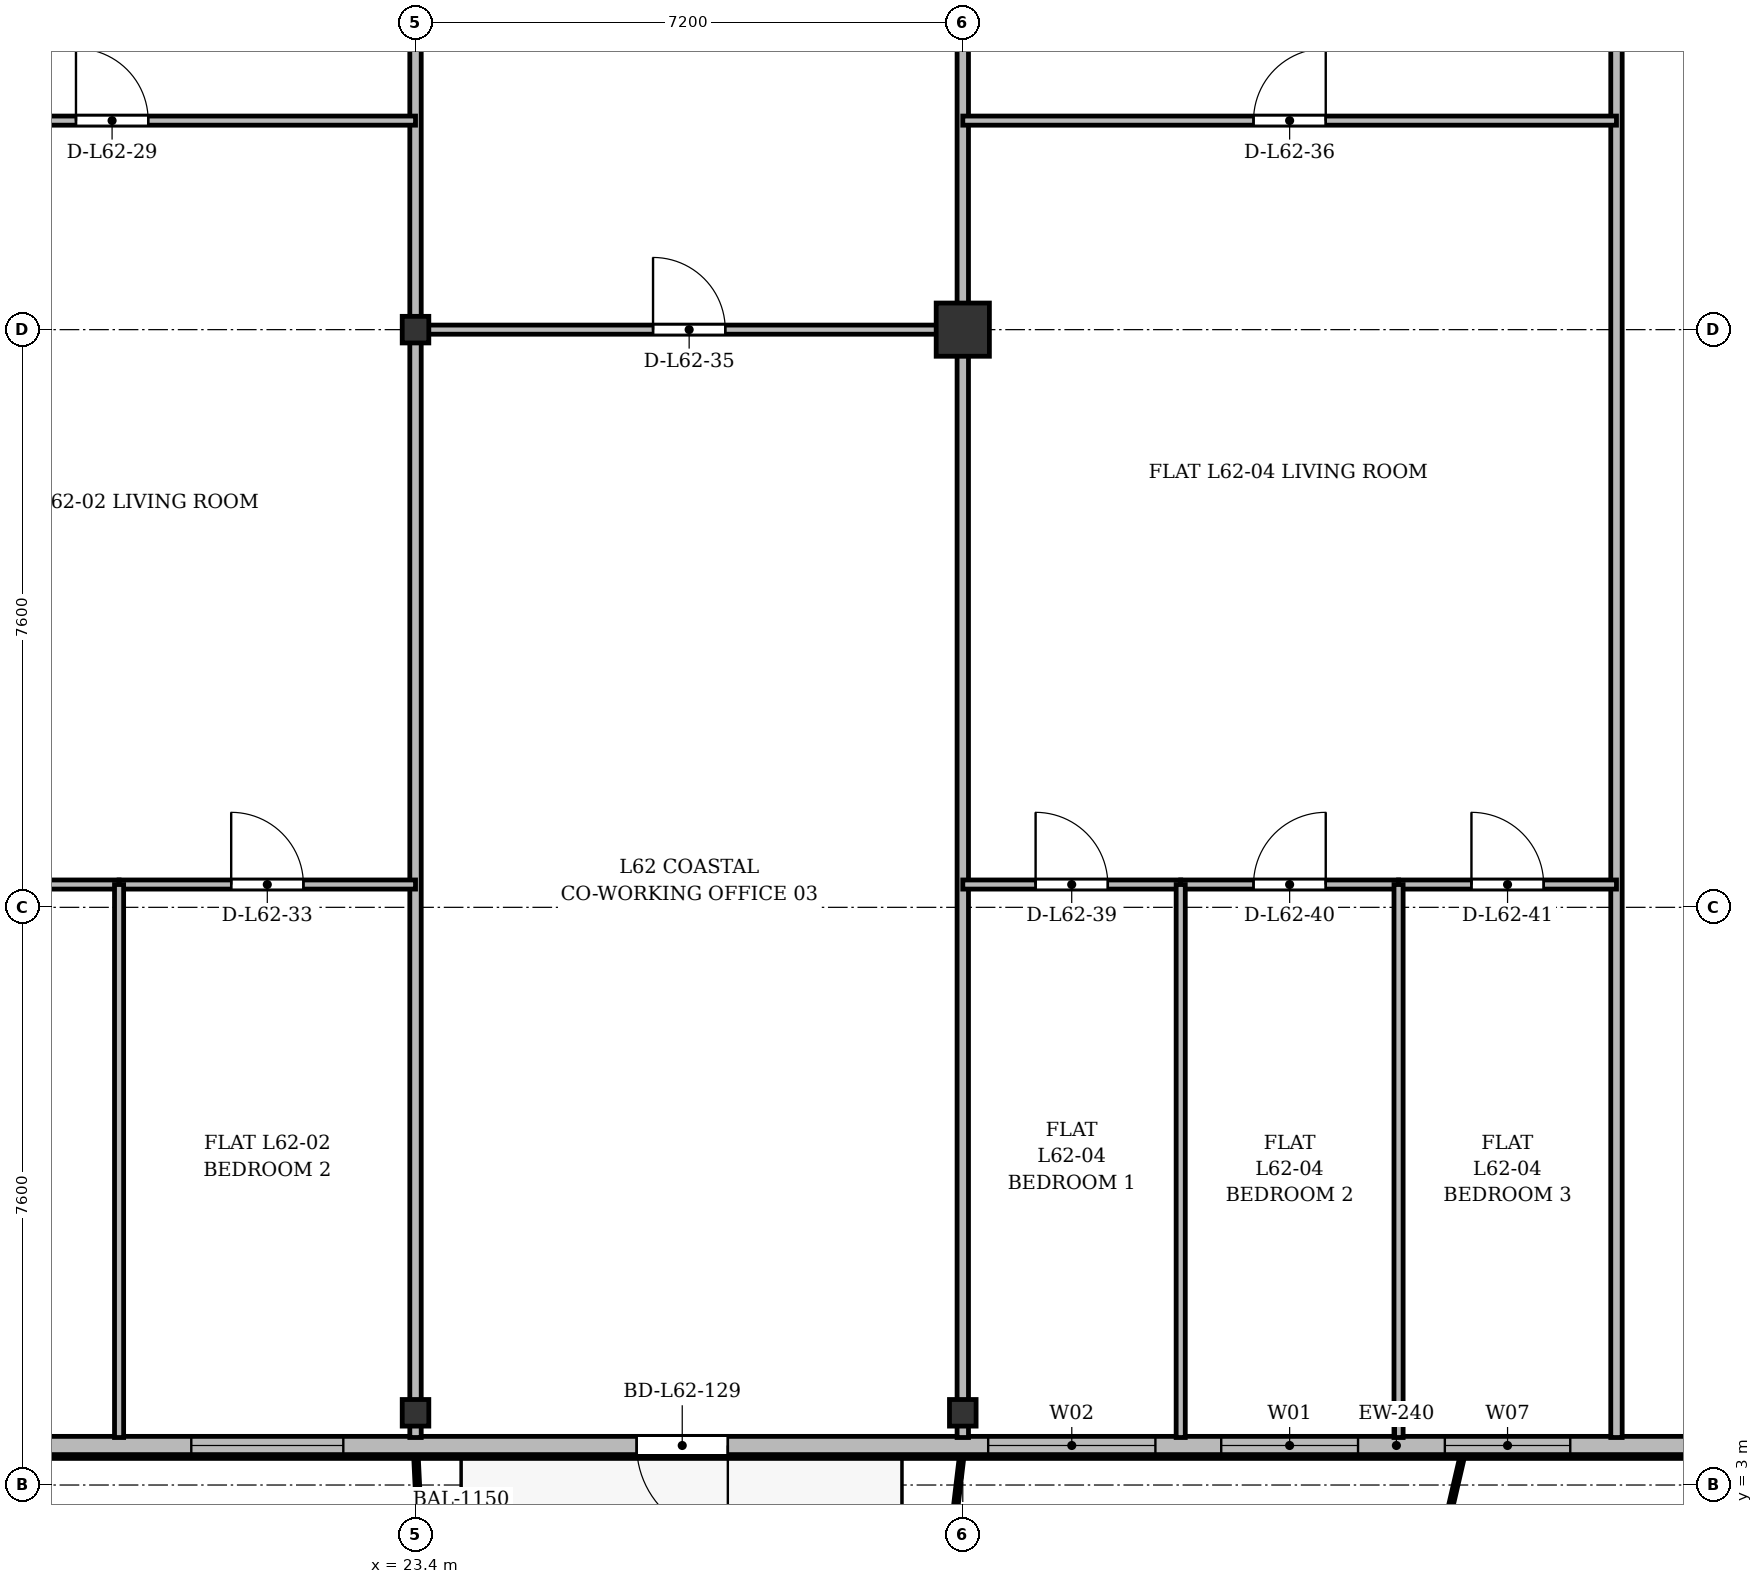
"""IFC4 building model, lengths in metres.
Left out: names, types, materials, properties, quantities, classifications, styles, units other than length and angle.
Written with IfcOpenShell. Run it as: python <this file> out.ifc"""

import sys

from ifc_helpers import new_model, si_unit, direction, frame, frame_2d, origin, origin_2d, place, context, subcontext, project, spatial, rectangle, i_section, extrude, source, transform, mapped, element, fill, save


model = new_model("IFC4")
c1 = context("Model", 3, precision=1e-05, world=origin(), true_north=direction((0.0, 1.0)))
c2 = subcontext(c1, "Body", "Model", "MODEL_VIEW")
j1 = project(units=[si_unit("LENGTHUNIT", "METRE"), si_unit("PLANEANGLEUNIT", "RADIAN")], contexts=[c1])
p1 = place(None, origin())
s1 = spatial("IfcSite", under=j1, at=p1, CompositionType="ELEMENT")
p2 = place(p1, origin())
s2 = spatial("IfcBuilding", under=s1, at=p2, CompositionType="ELEMENT")
p3 = place(p2, frame((0.0, 0.0, 237.3)))
s3 = spatial("IfcBuildingStorey", under=s2, at=p3, CompositionType="ELEMENT", Elevation=237.3)
m1 = source(origin(), c2, "Body", "SweptSolid", [
    extrude(i_section(OverallWidth=0.35, OverallDepth=0.35, WebThickness=0.018, FlangeThickness=0.028, at=origin_2d()), origin(), (0.0, 0.0, 1.0), 3.6),
])
for number, where, z_axis, x_axis in (
    (1, (23.4, 3.95, 0.0), (0.0, 0.0, 1.0), (1.0, 0.0, 0.0)),
    (2, (23.4, 18.2, 0.0), (0.0, 0.0, 1.0), (1.0, 0.0, 0.0)),
    (3, (30.6, 3.95, 0.0), (0.0, 0.0, 1.0), (1.0, 0.0, 0.0)),
):
    element("IfcColumn", number, at=place(p3, frame(where, z_axis=z_axis, x_axis=x_axis)), inside=s3, PredefinedType="COLUMN", context=c2, shape_type="MappedRepresentation", body=[
        mapped(m1, transform((0.0, 0.0, 0.0), x_axis=(1.0, 0.0, 0.0), y_axis=(0.0, 1.0, 0.0), z_axis=(0.0, 0.0, 1.0), scale=1.0)),
    ])
m2 = source(origin(), c2, "Body", "SweptSolid", [
    extrude(rectangle(XDim=0.7, YDim=0.7, at=origin_2d()), origin(), (0.0, 0.0, 1.0), 3.6),
])
p4 = place(p3, frame((30.6, 18.2, 0.0), z_axis=(0.0, 0.0, 1.0), x_axis=(1.0, 0.0, 0.0)))
e4 = element("IfcColumn", 4, at=p4, inside=s3, PredefinedType="COLUMN", context=c2, shape_type="MappedRepresentation", body=[
    mapped(m2, transform((0.0, 0.0, 0.0), x_axis=(1.0, 0.0, 0.0), y_axis=(0.0, 1.0, 0.0), z_axis=(0.0, 0.0, 1.0), scale=1.0)),
])
p5 = place(p3, frame((44.8, 3.52, 0.0), z_axis=(0.0, 0.0, 1.0), x_axis=(-1.0, 0.0, 0.0)))
e5 = element("IfcWall", 5, at=p5, inside=s3, PredefinedType="SOLIDWALL", context=c2, shape_type="SweptSolid", body=[
    extrude(rectangle(XDim=33.8, YDim=0.24, at=frame_2d((16.9, 0.0))), origin(), (0.0, 0.0, 1.0), 3.22),
])
p6 = place(p5, frame((2.3, 0.0, 0.9)))
e6 = element("IfcOpeningElement", 6, at=p6, cuts=e5, PredefinedType="OPENING", context=c2, shape_type="SweptSolid", body=[
    extrude(rectangle(XDim=2.0, YDim=1.95, at=frame_2d((1.0, 0.975))), frame((0.0, 0.13, 0.0), z_axis=(0.0, -1.0, 0.0), x_axis=(1.0, 0.0, 0.0)), (0.0, 0.0, 1.0), 0.26),
])
p7 = place(p5, frame((6.208, 0.0, 0.9)))
e7 = element("IfcOpeningElement", 7, at=p7, cuts=e5, PredefinedType="OPENING", context=c2, shape_type="SweptSolid", body=[
    extrude(rectangle(XDim=1.65, YDim=1.85, at=frame_2d((0.825, 0.925))), frame((0.0, 0.13, 0.0), z_axis=(0.0, -1.0, 0.0), x_axis=(1.0, 0.0, 0.0)), (0.0, 0.0, 1.0), 0.26),
])
p8 = place(p5, frame((9.0, 0.0, 0.9)))
e8 = element("IfcOpeningElement", 8, at=p8, cuts=e5, PredefinedType="OPENING", context=c2, shape_type="SweptSolid", body=[
    extrude(rectangle(XDim=1.8, YDim=1.8, at=frame_2d((0.9, 0.9))), frame((0.0, 0.13, 0.0), z_axis=(0.0, -1.0, 0.0), x_axis=(1.0, 0.0, 0.0)), (0.0, 0.0, 1.0), 0.26),
])
p9 = place(p5, frame((11.666, 0.0, 0.9)))
e9 = element("IfcOpeningElement", 9, at=p9, cuts=e5, PredefinedType="OPENING", context=c2, shape_type="SweptSolid", body=[
    extrude(rectangle(XDim=2.2, YDim=1.8, at=frame_2d((1.1, 0.9))), frame((0.0, 0.13, 0.0), z_axis=(0.0, -1.0, 0.0), x_axis=(1.0, 0.0, 0.0)), (0.0, 0.0, 1.0), 0.26),
])
p10 = place(p5, frame((17.291, 0.0, 0.0)))
e10 = element("IfcOpeningElement", 10, at=p10, cuts=e5, PredefinedType="OPENING", context=c2, shape_type="SweptSolid", body=[
    extrude(rectangle(XDim=1.2, YDim=2.2, at=frame_2d((0.6, 1.1))), frame((0.0, 0.13, 0.0), z_axis=(0.0, -1.0, 0.0), x_axis=(1.0, 0.0, 0.0)), (0.0, 0.0, 1.0), 0.26),
])
p11 = place(p5, frame((22.35, 0.0, 0.9)))
e11 = element("IfcOpeningElement", 11, at=p11, cuts=e5, PredefinedType="OPENING", context=c2, shape_type="SweptSolid", body=[
    extrude(rectangle(XDim=2.0, YDim=1.95, at=frame_2d((1.0, 0.975))), frame((0.0, 0.13, 0.0), z_axis=(0.0, -1.0, 0.0), x_axis=(1.0, 0.0, 0.0)), (0.0, 0.0, 1.0), 0.26),
])
p12 = place(p5, frame((26.425, 0.0, 0.9)))
e12 = element("IfcOpeningElement", 12, at=p12, cuts=e5, PredefinedType="OPENING", context=c2, shape_type="SweptSolid", body=[
    extrude(rectangle(XDim=1.65, YDim=1.85, at=frame_2d((0.825, 0.925))), frame((0.0, 0.13, 0.0), z_axis=(0.0, -1.0, 0.0), x_axis=(1.0, 0.0, 0.0)), (0.0, 0.0, 1.0), 0.26),
])
p13 = place(p5, frame((30.555, 0.0, 0.9)))
e13 = element("IfcOpeningElement", 13, at=p13, cuts=e5, PredefinedType="OPENING", context=c2, shape_type="SweptSolid", body=[
    extrude(rectangle(XDim=1.8, YDim=1.8, at=frame_2d((0.9, 0.9))), frame((0.0, 0.13, 0.0), z_axis=(0.0, -1.0, 0.0), x_axis=(1.0, 0.0, 0.0)), (0.0, 0.0, 1.0), 0.26),
])
for number, where, z_axis, x_axis in (
    (14, (23.4, 3.625, 0.0), (0.0, 0.0, 1.0), (0.0, 1.0, 0.0)),
    (15, (30.6, 3.625, 0.0), (0.0, 0.0, 1.0), (0.0, 1.0, 0.0)),
):
    element("IfcWall", number, at=place(p3, frame(where, z_axis=z_axis, x_axis=x_axis)), inside=s3, PredefinedType="PARTITIONING", context=c2, shape_type="SweptSolid", body=[
        extrude(rectangle(XDim=27.375, YDim=0.15, at=frame_2d((13.688, 0.0))), origin(), (0.0, 0.0, 1.0), 2.72),
    ])
p14 = place(p3, frame((39.2, 3.625, 0.0), z_axis=(0.0, 0.0, 1.0), x_axis=(0.0, 1.0, 0.0)))
e16 = element("IfcWall", 16, at=p14, inside=s3, PredefinedType="PARTITIONING", context=c2, shape_type="SweptSolid", body=[
    extrude(rectangle(XDim=27.375, YDim=0.15, at=frame_2d((13.688, 0.0))), origin(), (0.0, 0.0, 1.0), 2.77),
])
p15 = place(p3, frame((15.6, 20.95, 0.0), z_axis=(0.0, 0.0, 1.0), x_axis=(1.0, 0.0, 0.0)))
e17 = element("IfcWall", 17, at=p15, inside=s3, PredefinedType="PARTITIONING", context=c2, shape_type="SweptSolid", body=[
    extrude(rectangle(XDim=7.8, YDim=0.12, at=frame_2d((3.9, 0.0))), origin(), (0.0, 0.0, 1.0), 2.72),
])
p16 = place(p15, frame((3.333, 0.0, 0.0)))
e18 = element("IfcOpeningElement", 18, at=p16, cuts=e17, PredefinedType="OPENING", context=c2, shape_type="SweptSolid", body=[
    extrude(rectangle(XDim=0.95, YDim=2.15, at=frame_2d((0.475, 1.075))), frame((0.0, 0.07, 0.0), z_axis=(0.0, -1.0, 0.0), x_axis=(1.0, 0.0, 0.0)), (0.0, 0.0, 1.0), 0.14),
])
p17 = place(p3, frame((15.6, 10.9, 0.0), z_axis=(0.0, 0.0, 1.0), x_axis=(1.0, 0.0, 0.0)))
e19 = element("IfcWall", 19, at=p17, inside=s3, PredefinedType="PARTITIONING", context=c2, shape_type="SweptSolid", body=[
    extrude(rectangle(XDim=3.9, YDim=0.12, at=frame_2d((1.95, 0.0))), origin(), (0.0, 0.0, 1.0), 2.72),
])
p18 = place(p17, frame((1.475, 0.0, 0.0)))
e20 = element("IfcOpeningElement", 20, at=p18, cuts=e19, PredefinedType="OPENING", context=c2, shape_type="SweptSolid", body=[
    extrude(rectangle(XDim=0.95, YDim=2.15, at=frame_2d((0.475, 1.075))), frame((0.0, 0.07, 0.0), z_axis=(0.0, -1.0, 0.0), x_axis=(1.0, 0.0, 0.0)), (0.0, 0.0, 1.0), 0.14),
])
p19 = place(p3, frame((19.5, 10.9, 0.0), z_axis=(0.0, 0.0, 1.0), x_axis=(1.0, 0.0, 0.0)))
e21 = element("IfcWall", 21, at=p19, inside=s3, PredefinedType="PARTITIONING", context=c2, shape_type="SweptSolid", body=[
    extrude(rectangle(XDim=3.9, YDim=0.12, at=frame_2d((1.95, 0.0))), origin(), (0.0, 0.0, 1.0), 2.72),
])
p20 = place(p19, frame((1.475, 0.0, 0.0)))
e22 = element("IfcOpeningElement", 22, at=p20, cuts=e21, PredefinedType="OPENING", context=c2, shape_type="SweptSolid", body=[
    extrude(rectangle(XDim=0.95, YDim=2.15, at=frame_2d((0.475, 1.075))), frame((0.0, 0.07, 0.0), z_axis=(0.0, -1.0, 0.0), x_axis=(1.0, 0.0, 0.0)), (0.0, 0.0, 1.0), 0.14),
])
p21 = place(p3, frame((19.5, 3.625, 0.0), z_axis=(0.0, 0.0, 1.0), x_axis=(0.0, 1.0, 0.0)))
e23 = element("IfcWall", 23, at=p21, inside=s3, PredefinedType="PARTITIONING", context=c2, shape_type="SweptSolid", body=[
    extrude(rectangle(XDim=7.275, YDim=0.12, at=frame_2d((3.637, 0.0))), origin(), (0.0, 0.0, 1.0), 2.77),
])
p22 = place(p3, frame((23.4, 18.2, 0.0), z_axis=(0.0, 0.0, 1.0), x_axis=(1.0, 0.0, 0.0)))
e24 = element("IfcWall", 24, at=p22, inside=s3, PredefinedType="PARTITIONING", context=c2, shape_type="SweptSolid", body=[
    extrude(rectangle(XDim=7.2, YDim=0.12, at=frame_2d((3.6, 0.0))), origin(), (0.0, 0.0, 1.0), 2.77),
])
p23 = place(p22, frame((3.125, 0.0, 0.0)))
e25 = element("IfcOpeningElement", 25, at=p23, cuts=e24, PredefinedType="OPENING", context=c2, shape_type="SweptSolid", body=[
    extrude(rectangle(XDim=0.95, YDim=2.15, at=frame_2d((0.475, 1.075))), frame((0.0, 0.07, 0.0), z_axis=(0.0, -1.0, 0.0), x_axis=(1.0, 0.0, 0.0)), (0.0, 0.0, 1.0), 0.14),
])
p24 = place(p3, frame((30.6, 20.95, 0.0), z_axis=(0.0, 0.0, 1.0), x_axis=(1.0, 0.0, 0.0)))
e26 = element("IfcWall", 26, at=p24, inside=s3, PredefinedType="PARTITIONING", context=c2, shape_type="SweptSolid", body=[
    extrude(rectangle(XDim=8.6, YDim=0.12, at=frame_2d((4.3, 0.0))), origin(), (0.0, 0.0, 1.0), 2.72),
])
p25 = place(p24, frame((3.825, 0.0, 0.0)))
e27 = element("IfcOpeningElement", 27, at=p25, cuts=e26, PredefinedType="OPENING", context=c2, shape_type="SweptSolid", body=[
    extrude(rectangle(XDim=0.95, YDim=2.15, at=frame_2d((0.475, 1.075))), frame((0.0, 0.07, 0.0), z_axis=(0.0, -1.0, 0.0), x_axis=(1.0, 0.0, 0.0)), (0.0, 0.0, 1.0), 0.14),
])
p26 = place(p3, frame((30.6, 10.9, 0.0), z_axis=(0.0, 0.0, 1.0), x_axis=(1.0, 0.0, 0.0)))
e28 = element("IfcWall", 28, at=p26, inside=s3, PredefinedType="PARTITIONING", context=c2, shape_type="SweptSolid", body=[
    extrude(rectangle(XDim=2.867, YDim=0.12, at=frame_2d((1.434, 0.0))), origin(), (0.0, 0.0, 1.0), 2.72),
])
p27 = place(p26, frame((0.958, 0.0, 0.0)))
e29 = element("IfcOpeningElement", 29, at=p27, cuts=e28, PredefinedType="OPENING", context=c2, shape_type="SweptSolid", body=[
    extrude(rectangle(XDim=0.95, YDim=2.15, at=frame_2d((0.475, 1.075))), frame((0.0, 0.07, 0.0), z_axis=(0.0, -1.0, 0.0), x_axis=(1.0, 0.0, 0.0)), (0.0, 0.0, 1.0), 0.14),
])
p28 = place(p3, frame((33.467, 10.9, 0.0), z_axis=(0.0, 0.0, 1.0), x_axis=(1.0, 0.0, 0.0)))
e30 = element("IfcWall", 30, at=p28, inside=s3, PredefinedType="PARTITIONING", context=c2, shape_type="SweptSolid", body=[
    extrude(rectangle(XDim=2.866, YDim=0.12, at=frame_2d((1.433, 0.0))), origin(), (0.0, 0.0, 1.0), 3.22),
])
p29 = place(p28, frame((0.958, 0.0, 0.0)))
e31 = element("IfcOpeningElement", 31, at=p29, cuts=e30, PredefinedType="OPENING", context=c2, shape_type="SweptSolid", body=[
    extrude(rectangle(XDim=0.95, YDim=2.15, at=frame_2d((0.475, 1.075))), frame((0.0, 0.07, 0.0), z_axis=(0.0, -1.0, 0.0), x_axis=(1.0, 0.0, 0.0)), (0.0, 0.0, 1.0), 0.14),
])
p30 = place(p3, frame((33.467, 3.625, 0.0), z_axis=(0.0, 0.0, 1.0), x_axis=(0.0, 1.0, 0.0)))
e32 = element("IfcWall", 32, at=p30, inside=s3, PredefinedType="PARTITIONING", context=c2, shape_type="SweptSolid", body=[
    extrude(rectangle(XDim=7.275, YDim=0.12, at=frame_2d((3.637, 0.0))), origin(), (0.0, 0.0, 1.0), 2.77),
])
p31 = place(p3, frame((36.333, 10.9, 0.0), z_axis=(0.0, 0.0, 1.0), x_axis=(1.0, 0.0, 0.0)))
e33 = element("IfcWall", 33, at=p31, inside=s3, PredefinedType="PARTITIONING", context=c2, shape_type="SweptSolid", body=[
    extrude(rectangle(XDim=2.867, YDim=0.12, at=frame_2d((1.434, 0.0))), origin(), (0.0, 0.0, 1.0), 3.22),
])
p32 = place(p31, frame((0.959, 0.0, 0.0)))
e34 = element("IfcOpeningElement", 34, at=p32, cuts=e33, PredefinedType="OPENING", context=c2, shape_type="SweptSolid", body=[
    extrude(rectangle(XDim=0.95, YDim=2.15, at=frame_2d((0.475, 1.075))), frame((0.0, 0.07, 0.0), z_axis=(0.0, -1.0, 0.0), x_axis=(1.0, 0.0, 0.0)), (0.0, 0.0, 1.0), 0.14),
])
p33 = place(p3, frame((36.333, 3.625, 0.0), z_axis=(0.0, 0.0, 1.0), x_axis=(0.0, 1.0, 0.0)))
e35 = element("IfcWall", 35, at=p33, inside=s3, PredefinedType="PARTITIONING", context=c2, shape_type="SweptSolid", body=[
    extrude(rectangle(XDim=7.275, YDim=0.12, at=frame_2d((3.637, 0.0))), origin(), (0.0, 0.0, 1.0), 2.77),
])
m3 = source(origin(), c2, "Body", "SweptSolid", [
    extrude(rectangle(XDim=1.65, YDim=1.85, at=frame_2d((0.825, 0.925))), frame((0.0, 0.03, 0.0), z_axis=(0.0, -1.0, 0.0), x_axis=(1.0, 0.0, 0.0)), (0.0, 0.0, 1.0), 0.06),
])
p34 = place(p7, origin())
e36 = element("IfcWindow", 36, at=p34, inside=s3, PartitioningType="SINGLE_PANEL", PredefinedType="WINDOW", context=c2, shape_type="MappedRepresentation", body=[
    mapped(m3, transform((0.0, 0.0, 0.0), x_axis=(1.0, 0.0, 0.0), y_axis=(0.0, 1.0, 0.0), z_axis=(0.0, 0.0, 1.0), scale=1.0)),
])
fill(e7, e36)
m4 = source(origin(), c2, "Body", "SweptSolid", [
    extrude(rectangle(XDim=1.8, YDim=1.8, at=frame_2d((0.9, 0.9))), frame((0.0, 0.03, 0.0), z_axis=(0.0, -1.0, 0.0), x_axis=(1.0, 0.0, 0.0)), (0.0, 0.0, 1.0), 0.06),
])
p35 = place(p8, origin())
e37 = element("IfcWindow", 37, at=p35, inside=s3, PartitioningType="SINGLE_PANEL", PredefinedType="WINDOW", context=c2, shape_type="MappedRepresentation", body=[
    mapped(m4, transform((0.0, 0.0, 0.0), x_axis=(1.0, 0.0, 0.0), y_axis=(0.0, 1.0, 0.0), z_axis=(0.0, 0.0, 1.0), scale=1.0)),
])
fill(e8, e37)
m5 = source(origin(), c2, "Body", "SweptSolid", [
    extrude(rectangle(XDim=2.2, YDim=1.8, at=frame_2d((1.1, 0.9))), frame((0.0, 0.03, 0.0), z_axis=(0.0, -1.0, 0.0), x_axis=(1.0, 0.0, 0.0)), (0.0, 0.0, 1.0), 0.06),
])
p36 = place(p9, origin())
e38 = element("IfcWindow", 38, at=p36, inside=s3, PartitioningType="SINGLE_PANEL", PredefinedType="WINDOW", context=c2, shape_type="MappedRepresentation", body=[
    mapped(m5, transform((0.0, 0.0, 0.0), x_axis=(1.0, 0.0, 0.0), y_axis=(0.0, 1.0, 0.0), z_axis=(0.0, 0.0, 1.0), scale=1.0)),
])
fill(e9, e38)
m6 = source(origin(), c2, "Body", "SweptSolid", [
    extrude(rectangle(XDim=1.2, YDim=2.2, at=frame_2d((0.6, 1.1))), frame((0.0, 0.025, 0.0), z_axis=(0.0, -1.0, 0.0), x_axis=(1.0, 0.0, 0.0)), (0.0, 0.0, 1.0), 0.05),
])
p37 = place(p10, origin())
e39 = element("IfcDoor", 39, at=p37, inside=s3, OperationType="SINGLE_SWING_LEFT", PredefinedType="DOOR", context=c2, shape_type="MappedRepresentation", body=[
    mapped(m6, transform((0.0, 0.0, 0.0), x_axis=(1.0, 0.0, 0.0), y_axis=(0.0, 1.0, 0.0), z_axis=(0.0, 0.0, 1.0), scale=1.0)),
])
fill(e10, e39)
m7 = source(origin(), c2, "Body", "SweptSolid", [
    extrude(rectangle(XDim=2.0, YDim=1.95, at=frame_2d((1.0, 0.975))), frame((0.0, 0.03, 0.0), z_axis=(0.0, -1.0, 0.0), x_axis=(1.0, 0.0, 0.0)), (0.0, 0.0, 1.0), 0.06),
])
p38 = place(p11, origin())
e40 = element("IfcWindow", 40, at=p38, inside=s3, PartitioningType="SINGLE_PANEL", PredefinedType="WINDOW", context=c2, shape_type="MappedRepresentation", body=[
    mapped(m7, transform((0.0, 0.0, 0.0), x_axis=(1.0, 0.0, 0.0), y_axis=(0.0, 1.0, 0.0), z_axis=(0.0, 0.0, 1.0), scale=1.0)),
])
fill(e11, e40)
m8 = source(origin(), c2, "Body", "SweptSolid", [
    extrude(rectangle(XDim=0.95, YDim=2.15, at=frame_2d((0.475, 1.075))), frame((0.0, 0.025, 0.0), z_axis=(0.0, -1.0, 0.0), x_axis=(1.0, 0.0, 0.0)), (0.0, 0.0, 1.0), 0.05),
])
p39 = place(p16, origin())
e41 = element("IfcDoor", 41, at=p39, inside=s3, OperationType="SINGLE_SWING_LEFT", PredefinedType="DOOR", context=c2, shape_type="MappedRepresentation", body=[
    mapped(m8, transform((0.0, 0.0, 0.0), x_axis=(1.0, 0.0, 0.0), y_axis=(0.0, 1.0, 0.0), z_axis=(0.0, 0.0, 1.0), scale=1.0)),
])
fill(e18, e41)
p40 = place(p20, origin())
e42 = element("IfcDoor", 42, at=p40, inside=s3, OperationType="SINGLE_SWING_LEFT", PredefinedType="DOOR", context=c2, shape_type="MappedRepresentation", body=[
    mapped(m8, transform((0.0, 0.0, 0.0), x_axis=(1.0, 0.0, 0.0), y_axis=(0.0, 1.0, 0.0), z_axis=(0.0, 0.0, 1.0), scale=1.0)),
])
fill(e22, e42)
p41 = place(p23, origin())
e43 = element("IfcDoor", 43, at=p41, inside=s3, OperationType="SINGLE_SWING_LEFT", PredefinedType="DOOR", context=c2, shape_type="MappedRepresentation", body=[
    mapped(m8, transform((0.0, 0.0, 0.0), x_axis=(1.0, 0.0, 0.0), y_axis=(0.0, 1.0, 0.0), z_axis=(0.0, 0.0, 1.0), scale=1.0)),
])
fill(e25, e43)
p42 = place(p25, origin())
e44 = element("IfcDoor", 44, at=p42, inside=s3, OperationType="SINGLE_SWING_RIGHT", PredefinedType="DOOR", context=c2, shape_type="MappedRepresentation", body=[
    mapped(m8, transform((0.0, 0.0, 0.0), x_axis=(1.0, 0.0, 0.0), y_axis=(0.0, 1.0, 0.0), z_axis=(0.0, 0.0, 1.0), scale=1.0)),
])
fill(e27, e44)
p43 = place(p27, origin())
e45 = element("IfcDoor", 45, at=p43, inside=s3, OperationType="SINGLE_SWING_LEFT", PredefinedType="DOOR", context=c2, shape_type="MappedRepresentation", body=[
    mapped(m8, transform((0.0, 0.0, 0.0), x_axis=(1.0, 0.0, 0.0), y_axis=(0.0, 1.0, 0.0), z_axis=(0.0, 0.0, 1.0), scale=1.0)),
])
fill(e29, e45)
p44 = place(p29, origin())
e46 = element("IfcDoor", 46, at=p44, inside=s3, OperationType="SINGLE_SWING_RIGHT", PredefinedType="DOOR", context=c2, shape_type="MappedRepresentation", body=[
    mapped(m8, transform((0.0, 0.0, 0.0), x_axis=(1.0, 0.0, 0.0), y_axis=(0.0, 1.0, 0.0), z_axis=(0.0, 0.0, 1.0), scale=1.0)),
])
fill(e31, e46)
p45 = place(p32, origin())
e47 = element("IfcDoor", 47, at=p45, inside=s3, OperationType="SINGLE_SWING_LEFT", PredefinedType="DOOR", context=c2, shape_type="MappedRepresentation", body=[
    mapped(m8, transform((0.0, 0.0, 0.0), x_axis=(1.0, 0.0, 0.0), y_axis=(0.0, 1.0, 0.0), z_axis=(0.0, 0.0, 1.0), scale=1.0)),
])
fill(e34, e47)
save(model, sys.argv[1])
